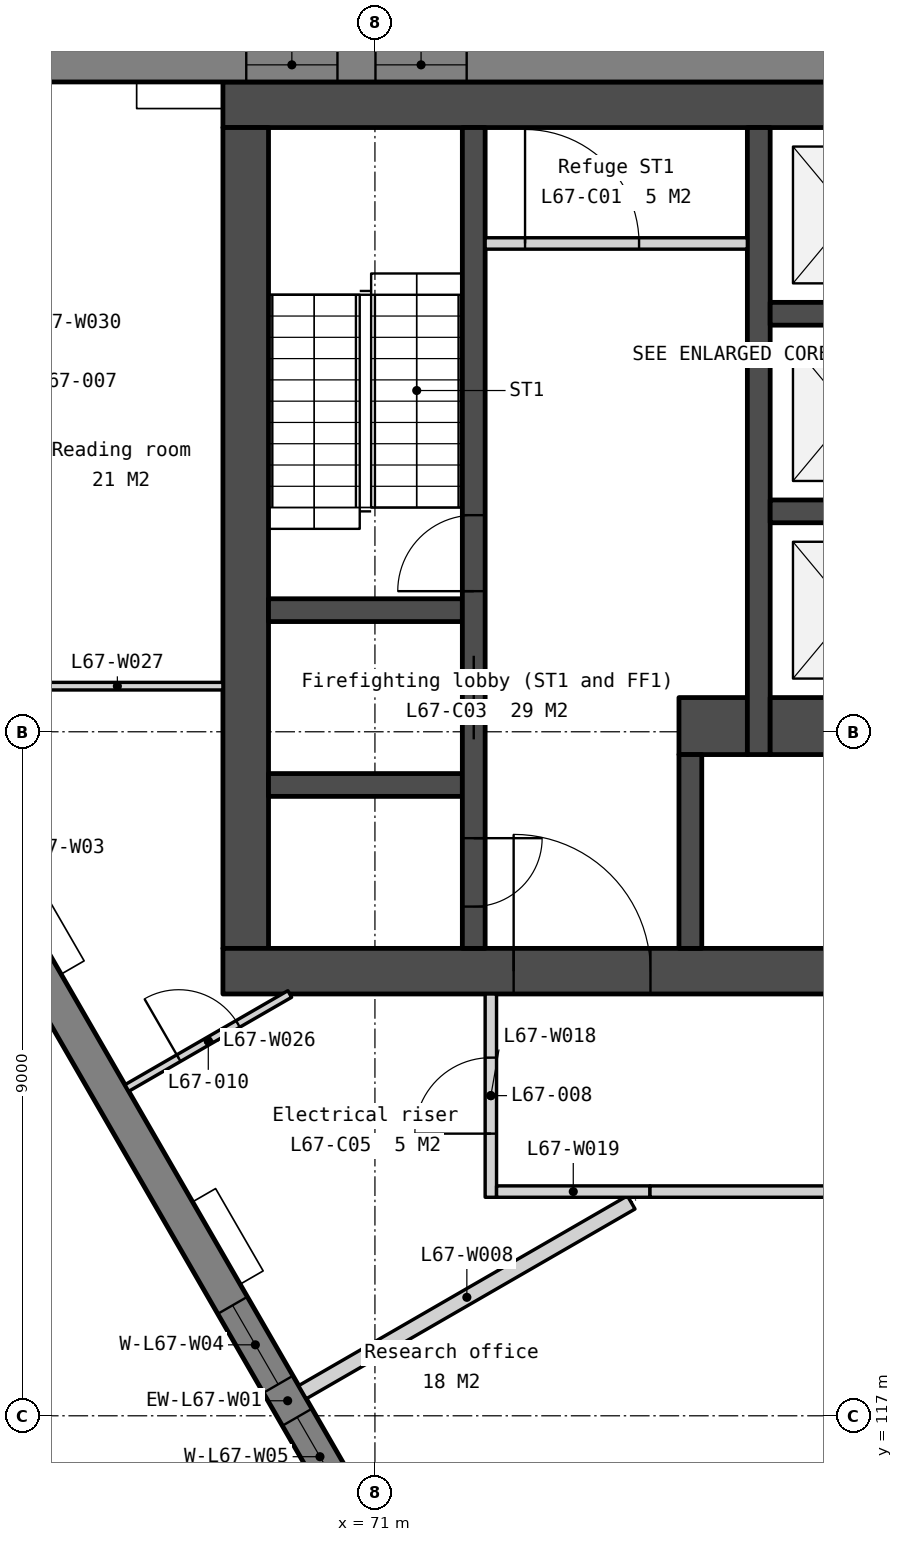
"""IFC4 building model, lengths in metres.
Left out: names, types, materials, properties, quantities, classifications, styles, units other than length and angle.
Written with IfcOpenShell. Run it as: python <this file> out.ifc"""

import sys

from ifc_helpers import new_model, si_unit, direction, frame, frame_2d, origin, place, context, subcontext, project, spatial, polyline, rectangle, outline, extrude, element, fill, save


model = new_model("IFC4")
c1 = context("Model", 3, precision=1e-05, world=origin(), true_north=direction((0.0, 1.0)))
c2 = subcontext(c1, "Body", "Model", "MODEL_VIEW")
j1 = project(units=[si_unit("LENGTHUNIT", "METRE"), si_unit("PLANEANGLEUNIT", "RADIAN")], contexts=[c1])
p1 = place(None, origin())
s1 = spatial("IfcSite", under=j1, at=p1, CompositionType="ELEMENT")
p2 = place(p1, origin())
s2 = spatial("IfcBuilding", under=s1, at=p2, CompositionType="ELEMENT")
p3 = place(p2, frame((0.0, 0.0, 273.8)))
s3 = spatial("IfcBuildingStorey", under=s2, at=p3, CompositionType="ELEMENT", Elevation=273.8)
p4 = place(p3, frame((69.0, 134.25, 0.0), z_axis=(0.0, 0.0, 1.0), x_axis=(1.0, 0.0, 0.0)))
e1 = element("IfcWall", 1, at=p4, inside=s3, PredefinedType="SOLIDWALL", context=c2, shape_type="SweptSolid", body=[
    extrude(rectangle(XDim=22.0, YDim=0.6, at=frame_2d((11.0, 0.0))), origin(), (0.0, 0.0, 1.0), 3.75),
])
p5 = place(p3, frame((69.3, 133.95, 0.0), z_axis=(0.0, 0.0, 1.0), x_axis=(0.0, -1.0, 0.0)))
e2 = element("IfcWall", 2, at=p5, inside=s3, PredefinedType="SOLIDWALL", context=c2, shape_type="SweptSolid", body=[
    extrude(rectangle(XDim=10.8, YDim=0.6, at=frame_2d((5.4, 0.0))), origin(), (0.0, 0.0, 1.0), 3.75),
])
p6 = place(p3, frame((69.0, 122.85, 0.0), z_axis=(0.0, 0.0, 1.0), x_axis=(1.0, 0.0, 0.0)))
e3 = element("IfcWall", 3, at=p6, inside=s3, PredefinedType="SOLIDWALL", context=c2, shape_type="SweptSolid", body=[
    extrude(rectangle(XDim=22.0, YDim=0.6, at=frame_2d((11.0, 0.0))), origin(), (0.0, 0.0, 1.0), 3.75),
])
p7 = place(p6, frame((16.375, 0.0, 0.0)))
e4 = element("IfcOpeningElement", 4, at=p7, cuts=e3, PredefinedType="OPENING", context=c2, shape_type="SweptSolid", body=[
    extrude(rectangle(XDim=1.8, YDim=2.1, at=frame_2d((0.9, 1.05))), frame((0.0, 0.31, 0.0), z_axis=(0.0, -1.0, 0.0), x_axis=(1.0, 0.0, 0.0)), (0.0, 0.0, 1.0), 0.62),
])
p8 = place(p6, frame((3.825, 0.0, 0.0)))
e5 = element("IfcOpeningElement", 5, at=p8, cuts=e3, PredefinedType="OPENING", context=c2, shape_type="SweptSolid", body=[
    extrude(rectangle(XDim=1.8, YDim=2.1, at=frame_2d((0.9, 1.05))), frame((0.0, 0.31, 0.0), z_axis=(0.0, -1.0, 0.0), x_axis=(1.0, 0.0, 0.0)), (0.0, 0.0, 1.0), 0.62),
])
p9 = place(p6, frame((12.85, 0.0, 0.0)))
e6 = element("IfcOpeningElement", 6, at=p9, cuts=e3, PredefinedType="OPENING", context=c2, shape_type="SweptSolid", body=[
    extrude(rectangle(XDim=1.5, YDim=2.1, at=frame_2d((0.75, 1.05))), frame((0.0, 0.31, 0.0), z_axis=(0.0, -1.0, 0.0), x_axis=(1.0, 0.0, 0.0)), (0.0, 0.0, 1.0), 0.62),
])
for number, where, z_axis, x_axis in (
    (7, (69.6, 127.6, 0.0), (0.0, 0.0, 1.0), (1.0, 0.0, 0.0)),
    (8, (69.6, 125.3, 0.0), (0.0, 0.0, 1.0), (1.0, 0.0, 0.0)),
):
    element("IfcWall", number, at=place(p3, frame(where, z_axis=z_axis, x_axis=x_axis)), inside=s3, PredefinedType="SOLIDWALL", context=c2, shape_type="SweptSolid", body=[
        extrude(rectangle(XDim=2.55, YDim=0.3, at=frame_2d((1.275, 0.0))), origin(), (0.0, 0.0, 1.0), 3.75),
    ])
p10 = place(p3, frame((72.3, 133.95, 0.0), z_axis=(0.0, 0.0, 1.0), x_axis=(0.0, -1.0, 0.0)))
e9 = element("IfcWall", 9, at=p10, inside=s3, PredefinedType="SOLIDWALL", context=c2, shape_type="SweptSolid", body=[
    extrude(rectangle(XDim=10.8, YDim=0.3, at=frame_2d((5.4, 0.0))), origin(), (0.0, 0.0, 1.0), 3.75),
])
p11 = place(p10, frame((6.95, 0.0, 0.0)))
e10 = element("IfcOpeningElement", 10, at=p11, cuts=e9, PredefinedType="OPENING", context=c2, shape_type="SweptSolid", body=[
    extrude(rectangle(XDim=1.1, YDim=2.1, at=frame_2d((0.55, 1.05))), frame((0.0, 0.16, 0.0), z_axis=(0.0, -1.0, 0.0), x_axis=(1.0, 0.0, 0.0)), (0.0, 0.0, 1.0), 0.32),
])
p12 = place(p10, frame((9.35, 0.0, 0.0)))
e11 = element("IfcOpeningElement", 11, at=p12, cuts=e9, PredefinedType="OPENING", context=c2, shape_type="SweptSolid", body=[
    extrude(rectangle(XDim=0.9, YDim=2.1, at=frame_2d((0.45, 1.05))), frame((0.0, 0.16, 0.0), z_axis=(0.0, -1.0, 0.0), x_axis=(1.0, 0.0, 0.0)), (0.0, 0.0, 1.0), 0.32),
])
p13 = place(p10, frame((5.1, 0.0, 0.0)))
e12 = element("IfcOpeningElement", 12, at=p13, cuts=e9, PredefinedType="OPENING", context=c2, shape_type="SweptSolid", body=[
    extrude(rectangle(XDim=1.0, YDim=2.1, at=frame_2d((0.5, 1.05))), frame((0.0, 0.16, 0.0), z_axis=(0.0, -1.0, 0.0), x_axis=(1.0, 0.0, 0.0)), (0.0, 0.0, 1.0), 0.32),
])
p14 = place(p3, frame((72.45, 132.425, 0.0), z_axis=(0.0, 0.0, 1.0), x_axis=(1.0, 0.0, 0.0)))
e13 = element("IfcWall", 13, at=p14, inside=s3, PredefinedType="PARTITIONING", context=c2, shape_type="SweptSolid", body=[
    extrude(rectangle(XDim=3.45, YDim=0.15, at=frame_2d((1.725, 0.0))), origin(), (0.0, 0.0, 1.0), 3.75),
])
p15 = place(p14, frame((0.525, 0.0, 0.0)))
e14 = element("IfcOpeningElement", 14, at=p15, cuts=e13, PredefinedType="OPENING", context=c2, shape_type="SweptSolid", body=[
    extrude(rectangle(XDim=1.5, YDim=2.1, at=frame_2d((0.75, 1.05))), frame((0.0, 0.085, 0.0), z_axis=(0.0, -1.0, 0.0), x_axis=(1.0, 0.0, 0.0)), (0.0, 0.0, 1.0), 0.17),
])
p16 = place(p3, frame((75.0, 126.075, 0.0), z_axis=(0.0, 0.0, 1.0), x_axis=(1.0, 0.0, 0.0)))
e15 = element("IfcWall", 15, at=p16, inside=s3, PredefinedType="SOLIDWALL", context=c2, shape_type="SweptSolid", body=[
    extrude(rectangle(XDim=0.9, YDim=0.75, at=frame_2d((0.45, 0.0))), origin(), (0.0, 0.0, 1.0), 3.75),
])
p17 = place(p3, frame((75.15, 125.7, 0.0), z_axis=(0.0, 0.0, 1.0), x_axis=(0.0, -1.0, 0.0)))
e16 = element("IfcWall", 16, at=p17, inside=s3, PredefinedType="SOLIDWALL", context=c2, shape_type="SweptSolid", body=[
    extrude(rectangle(XDim=2.55, YDim=0.3, at=frame_2d((1.275, 0.0))), origin(), (0.0, 0.0, 1.0), 3.75),
])
p18 = place(p3, frame((76.05, 133.95, 0.0), z_axis=(0.0, 0.0, 1.0), x_axis=(0.0, -1.0, 0.0)))
e17 = element("IfcWall", 17, at=p18, inside=s3, PredefinedType="SOLIDWALL", context=c2, shape_type="SweptSolid", body=[
    extrude(rectangle(XDim=8.25, YDim=0.3, at=frame_2d((4.125, 0.0))), origin(), (0.0, 0.0, 1.0), 3.75),
])
for number, where, z_axis, x_axis in (
    (18, (76.2, 131.5, 0.0), (0.0, 0.0, 1.0), (1.0, 0.0, 0.0)),
    (19, (76.2, 128.9, 0.0), (0.0, 0.0, 1.0), (1.0, 0.0, 0.0)),
):
    element("IfcWall", number, at=place(p3, frame(where, z_axis=z_axis, x_axis=x_axis)), inside=s3, PredefinedType="SOLIDWALL", context=c2, shape_type="SweptSolid", body=[
        extrude(rectangle(XDim=2.1, YDim=0.3, at=frame_2d((1.05, 0.0))), origin(), (0.0, 0.0, 1.0), 3.75),
    ])
p19 = place(p3, frame((76.2, 126.075, 0.0), z_axis=(0.0, 0.0, 1.0), x_axis=(1.0, 0.0, 0.0)))
e20 = element("IfcWall", 20, at=p19, inside=s3, PredefinedType="SOLIDWALL", context=c2, shape_type="SweptSolid", body=[
    extrude(rectangle(XDim=2.1, YDim=0.75, at=frame_2d((1.05, 0.0))), origin(), (0.0, 0.0, 1.0), 3.75),
])
p20 = place(p3, frame((98.486, 134.775, -0.15), z_axis=(0.0, 0.0, 1.0), x_axis=(-1.0, 0.0, 0.0)))
e21 = element("IfcWall", 21, at=p20, inside=s3, PredefinedType="SOLIDWALL", context=c2, shape_type="SweptSolid", body=[
    extrude(outline(polyline([(36.972, 0.0), (36.972, 3.9), (0.0, 3.9), (0.0, 0.0), (36.972, 0.0)])), frame((0.0, 0.225, 0.0), z_axis=(0.0, -1.0, 0.0), x_axis=(1.0, 0.0, 0.0)), (0.0, 0.0, 1.0), 0.45),
])
p21 = place(p20, frame((0.715, 0.0, 0.95)))
e22 = element("IfcOpeningElement", 22, at=p21, cuts=e21, PredefinedType="OPENING", context=c2, shape_type="SweptSolid", body=[
    extrude(rectangle(XDim=1.2, YDim=2.2, at=frame_2d((0.6, 1.1))), frame((0.0, 0.235, 0.0), z_axis=(0.0, -1.0, 0.0), x_axis=(1.0, 0.0, 0.0)), (0.0, 0.0, 1.0), 0.47),
])
p22 = place(p20, frame((7.793, 0.0, 0.95)))
e23 = element("IfcOpeningElement", 23, at=p22, cuts=e21, PredefinedType="OPENING", context=c2, shape_type="SweptSolid", body=[
    extrude(rectangle(XDim=1.2, YDim=2.2, at=frame_2d((0.6, 1.1))), frame((0.0, 0.235, 0.0), z_axis=(0.0, -1.0, 0.0), x_axis=(1.0, 0.0, 0.0)), (0.0, 0.0, 1.0), 0.47),
])
p23 = place(p20, frame((9.493, 0.0, 0.95)))
e24 = element("IfcOpeningElement", 24, at=p23, cuts=e21, PredefinedType="OPENING", context=c2, shape_type="SweptSolid", body=[
    extrude(rectangle(XDim=1.2, YDim=2.2, at=frame_2d((0.6, 1.1))), frame((0.0, 0.235, 0.0), z_axis=(0.0, -1.0, 0.0), x_axis=(1.0, 0.0, 0.0)), (0.0, 0.0, 1.0), 0.47),
])
p24 = place(p20, frame((17.036, 0.0, 0.95)))
e25 = element("IfcOpeningElement", 25, at=p24, cuts=e21, PredefinedType="OPENING", context=c2, shape_type="SweptSolid", body=[
    extrude(rectangle(XDim=1.2, YDim=2.2, at=frame_2d((0.6, 1.1))), frame((0.0, 0.235, 0.0), z_axis=(0.0, -1.0, 0.0), x_axis=(1.0, 0.0, 0.0)), (0.0, 0.0, 1.0), 0.47),
])
p25 = place(p20, frame((18.736, 0.0, 0.95)))
e26 = element("IfcOpeningElement", 26, at=p25, cuts=e21, PredefinedType="OPENING", context=c2, shape_type="SweptSolid", body=[
    extrude(rectangle(XDim=1.2, YDim=2.2, at=frame_2d((0.6, 1.1))), frame((0.0, 0.235, 0.0), z_axis=(0.0, -1.0, 0.0), x_axis=(1.0, 0.0, 0.0)), (0.0, 0.0, 1.0), 0.47),
])
p26 = place(p20, frame((26.279, 0.0, 0.95)))
e27 = element("IfcOpeningElement", 27, at=p26, cuts=e21, PredefinedType="OPENING", context=c2, shape_type="SweptSolid", body=[
    extrude(rectangle(XDim=1.2, YDim=2.2, at=frame_2d((0.6, 1.1))), frame((0.0, 0.235, 0.0), z_axis=(0.0, -1.0, 0.0), x_axis=(1.0, 0.0, 0.0)), (0.0, 0.0, 1.0), 0.47),
])
p27 = place(p20, frame((27.979, 0.0, 0.95)))
e28 = element("IfcOpeningElement", 28, at=p27, cuts=e21, PredefinedType="OPENING", context=c2, shape_type="SweptSolid", body=[
    extrude(rectangle(XDim=1.2, YDim=2.2, at=frame_2d((0.6, 1.1))), frame((0.0, 0.235, 0.0), z_axis=(0.0, -1.0, 0.0), x_axis=(1.0, 0.0, 0.0)), (0.0, 0.0, 1.0), 0.47),
])
p28 = place(p20, frame((35.058, 0.0, 0.95)))
e29 = element("IfcOpeningElement", 29, at=p28, cuts=e21, PredefinedType="OPENING", context=c2, shape_type="SweptSolid", body=[
    extrude(rectangle(XDim=1.2, YDim=2.2, at=frame_2d((0.6, 1.1))), frame((0.0, 0.235, 0.0), z_axis=(0.0, -1.0, 0.0), x_axis=(1.0, 0.0, 0.0)), (0.0, 0.0, 1.0), 0.47),
])
p29 = place(p3, frame((60.609, 133.207, -0.15), z_axis=(0.0, 0.0, 1.0), x_axis=(0.500002536638, -0.866023939251, 0.0)))
e30 = element("IfcWall", 30, at=p29, inside=s3, PredefinedType="SOLIDWALL", context=c2, shape_type="SweptSolid", body=[
    extrude(outline(polyline([(36.972, 0.0), (36.972, 3.9), (0.0, 3.9), (0.0, 0.0), (36.972, 0.0)])), frame((0.0, 0.225, 0.0), z_axis=(0.0, -1.0, 0.0), x_axis=(1.0, 0.0, 0.0)), (0.0, 0.0, 1.0), 0.45),
])
p30 = place(p29, frame((0.715, 0.0, 0.95)))
e31 = element("IfcOpeningElement", 31, at=p30, cuts=e30, PredefinedType="OPENING", context=c2, shape_type="SweptSolid", body=[
    extrude(rectangle(XDim=1.2, YDim=2.2, at=frame_2d((0.6, 1.1))), frame((0.0, 0.235, 0.0), z_axis=(0.0, -1.0, 0.0), x_axis=(1.0, 0.0, 0.0)), (0.0, 0.0, 1.0), 0.47),
])
p31 = place(p29, frame((7.793, 0.0, 0.95)))
e32 = element("IfcOpeningElement", 32, at=p31, cuts=e30, PredefinedType="OPENING", context=c2, shape_type="SweptSolid", body=[
    extrude(rectangle(XDim=1.2, YDim=2.2, at=frame_2d((0.6, 1.1))), frame((0.0, 0.235, 0.0), z_axis=(0.0, -1.0, 0.0), x_axis=(1.0, 0.0, 0.0)), (0.0, 0.0, 1.0), 0.47),
])
p32 = place(p29, frame((9.493, 0.0, 0.95)))
e33 = element("IfcOpeningElement", 33, at=p32, cuts=e30, PredefinedType="OPENING", context=c2, shape_type="SweptSolid", body=[
    extrude(rectangle(XDim=1.2, YDim=2.2, at=frame_2d((0.6, 1.1))), frame((0.0, 0.235, 0.0), z_axis=(0.0, -1.0, 0.0), x_axis=(1.0, 0.0, 0.0)), (0.0, 0.0, 1.0), 0.47),
])
p33 = place(p29, frame((17.036, 0.0, 0.95)))
e34 = element("IfcOpeningElement", 34, at=p33, cuts=e30, PredefinedType="OPENING", context=c2, shape_type="SweptSolid", body=[
    extrude(rectangle(XDim=1.2, YDim=2.2, at=frame_2d((0.6, 1.1))), frame((0.0, 0.235, 0.0), z_axis=(0.0, -1.0, 0.0), x_axis=(1.0, 0.0, 0.0)), (0.0, 0.0, 1.0), 0.47),
])
p34 = place(p29, frame((18.736, 0.0, 0.95)))
e35 = element("IfcOpeningElement", 35, at=p34, cuts=e30, PredefinedType="OPENING", context=c2, shape_type="SweptSolid", body=[
    extrude(rectangle(XDim=1.2, YDim=2.2, at=frame_2d((0.6, 1.1))), frame((0.0, 0.235, 0.0), z_axis=(0.0, -1.0, 0.0), x_axis=(1.0, 0.0, 0.0)), (0.0, 0.0, 1.0), 0.47),
])
p35 = place(p29, frame((26.279, 0.0, 0.95)))
e36 = element("IfcOpeningElement", 36, at=p35, cuts=e30, PredefinedType="OPENING", context=c2, shape_type="SweptSolid", body=[
    extrude(rectangle(XDim=1.2, YDim=2.2, at=frame_2d((0.6, 1.1))), frame((0.0, 0.235, 0.0), z_axis=(0.0, -1.0, 0.0), x_axis=(1.0, 0.0, 0.0)), (0.0, 0.0, 1.0), 0.47),
])
p36 = place(p29, frame((27.979, 0.0, 0.95)))
e37 = element("IfcOpeningElement", 37, at=p36, cuts=e30, PredefinedType="OPENING", context=c2, shape_type="SweptSolid", body=[
    extrude(rectangle(XDim=1.2, YDim=2.2, at=frame_2d((0.6, 1.1))), frame((0.0, 0.235, 0.0), z_axis=(0.0, -1.0, 0.0), x_axis=(1.0, 0.0, 0.0)), (0.0, 0.0, 1.0), 0.47),
])
p37 = place(p29, frame((35.058, 0.0, 0.95)))
e38 = element("IfcOpeningElement", 38, at=p37, cuts=e30, PredefinedType="OPENING", context=c2, shape_type="SweptSolid", body=[
    extrude(rectangle(XDim=1.2, YDim=2.2, at=frame_2d((0.6, 1.1))), frame((0.0, 0.235, 0.0), z_axis=(0.0, -1.0, 0.0), x_axis=(1.0, 0.0, 0.0)), (0.0, 0.0, 1.0), 0.47),
])
p38 = place(p3, frame((70.047, 117.31, 0.0), z_axis=(0.0, 0.0, 1.0), x_axis=(0.866032544947, 0.499987630939, 0.0)))
e39 = element("IfcWall", 39, at=p38, inside=s3, PredefinedType="PARTITIONING", context=c2, shape_type="SweptSolid", body=[
    extrude(rectangle(XDim=4.994, YDim=0.2, at=frame_2d((2.497, 0.0))), origin(), (0.0, 0.0, 1.0), 3.75),
])
p39 = place(p3, frame((72.525, 119.875, 0.0), z_axis=(0.0, 0.0, 1.0), x_axis=(0.0, 1.0, 0.0)))
e40 = element("IfcWall", 40, at=p39, inside=s3, PredefinedType="PARTITIONING", context=c2, shape_type="SweptSolid", body=[
    extrude(rectangle(XDim=2.675, YDim=0.15, at=frame_2d((1.337, 0.0))), origin(), (0.0, 0.0, 1.0), 3.75),
])
p40 = place(p39, frame((0.837, 0.0, 0.0)))
e41 = element("IfcOpeningElement", 41, at=p40, cuts=e40, PredefinedType="OPENING", context=c2, shape_type="SweptSolid", body=[
    extrude(rectangle(XDim=1.0, YDim=2.1, at=frame_2d((0.5, 1.05))), frame((0.0, 0.085, 0.0), z_axis=(0.0, -1.0, 0.0), x_axis=(1.0, 0.0, 0.0)), (0.0, 0.0, 1.0), 0.17),
])
p41 = place(p3, frame((72.6, 119.95, 0.0), z_axis=(0.0, 0.0, 1.0), x_axis=(1.0, 0.0, 0.0)))
e42 = element("IfcWall", 42, at=p41, inside=s3, PredefinedType="PARTITIONING", context=c2, shape_type="SweptSolid", body=[
    extrude(rectangle(XDim=2.019, YDim=0.15, at=frame_2d((1.009, 0.0))), origin(), (0.0, 0.0, 1.0), 3.75),
])
p42 = place(p3, frame((74.619, 119.95, 0.0), z_axis=(0.0, 0.0, 1.0), x_axis=(1.0, 0.0, 0.0)))
e43 = element("IfcWall", 43, at=p42, inside=s3, PredefinedType="PARTITIONING", context=c2, shape_type="SweptSolid", body=[
    extrude(rectangle(XDim=6.581, YDim=0.15, at=frame_2d((3.291, 0.0))), origin(), (0.0, 0.0, 1.0), 3.75),
])
p43 = place(p42, frame((2.791, 0.0, 0.0)))
e44 = element("IfcOpeningElement", 44, at=p43, cuts=e43, PredefinedType="OPENING", context=c2, shape_type="SweptSolid", body=[
    extrude(rectangle(XDim=1.0, YDim=2.1, at=frame_2d((0.5, 1.05))), frame((0.0, 0.085, 0.0), z_axis=(0.0, -1.0, 0.0), x_axis=(1.0, 0.0, 0.0)), (0.0, 0.0, 1.0), 0.17),
])
p44 = place(p3, frame((67.736, 121.313, 0.0), z_axis=(0.0, 0.0, 1.0), x_axis=(0.86604923931, 0.499958713387, 0.0)))
e45 = element("IfcWall", 45, at=p44, inside=s3, PredefinedType="PARTITIONING", context=c2, shape_type="SweptSolid", body=[
    extrude(rectangle(XDim=2.475, YDim=0.1, at=frame_2d((1.237, 0.0))), origin(), (0.0, 0.0, 1.0), 3.75),
])
p45 = place(p44, frame((0.787, 0.0, 0.0)))
e46 = element("IfcOpeningElement", 46, at=p45, cuts=e45, PredefinedType="OPENING", context=c2, shape_type="SweptSolid", body=[
    extrude(rectangle(XDim=0.9, YDim=2.1, at=frame_2d((0.45, 1.05))), frame((0.0, 0.06, 0.0), z_axis=(0.0, -1.0, 0.0), x_axis=(1.0, 0.0, 0.0)), (0.0, 0.0, 1.0), 0.12),
])
p46 = place(p3, frame((66.222, 126.6, 0.0), z_axis=(0.0, 0.0, 1.0), x_axis=(1.0, 0.0, 0.0)))
e47 = element("IfcWall", 47, at=p46, inside=s3, PredefinedType="PARTITIONING", context=c2, shape_type="SweptSolid", body=[
    extrude(rectangle(XDim=2.778, YDim=0.1, at=frame_2d((1.389, 0.0))), origin(), (0.0, 0.0, 1.0), 3.75),
])
p47 = place(p11, origin())
e48 = element("IfcDoor", 48, at=p47, inside=s3, OperationType="SLIDING_TO_LEFT", PredefinedType="DOOR", context=c2, shape_type="SweptSolid", body=[
    extrude(rectangle(XDim=1.1, YDim=2.1, at=frame_2d((0.55, 1.05))), frame((0.0, 0.025, 0.0), z_axis=(0.0, -1.0, 0.0), x_axis=(1.0, 0.0, 0.0)), (0.0, 0.0, 1.0), 0.05),
])
fill(e10, e48)
p48 = place(p8, origin())
e49 = element("IfcDoor", 49, at=p48, inside=s3, OperationType="DOUBLE_DOOR_DOUBLE_SWING", PredefinedType="DOOR", context=c2, shape_type="SweptSolid", body=[
    extrude(rectangle(XDim=1.8, YDim=2.1, at=frame_2d((0.9, 1.05))), frame((0.0, 0.025, 0.0), z_axis=(0.0, -1.0, 0.0), x_axis=(1.0, 0.0, 0.0)), (0.0, 0.0, 1.0), 0.05),
])
fill(e5, e49)
p49 = place(p15, origin())
e50 = element("IfcDoor", 50, at=p49, inside=s3, OperationType="DOUBLE_DOOR_DOUBLE_SWING", PredefinedType="DOOR", context=c2, shape_type="SweptSolid", body=[
    extrude(rectangle(XDim=1.5, YDim=2.1, at=frame_2d((0.75, 1.05))), frame((0.0, 0.025, 0.0), z_axis=(0.0, -1.0, 0.0), x_axis=(1.0, 0.0, 0.0)), (0.0, 0.0, 1.0), 0.05),
])
fill(e14, e50)
p50 = place(p12, origin())
e51 = element("IfcDoor", 51, at=p50, inside=s3, OperationType="SINGLE_SWING_LEFT", PredefinedType="DOOR", context=c2, shape_type="SweptSolid", body=[
    extrude(rectangle(XDim=0.9, YDim=2.1, at=frame_2d((0.45, 1.05))), frame((0.0, 0.025, 0.0), z_axis=(0.0, -1.0, 0.0), x_axis=(1.0, 0.0, 0.0)), (0.0, 0.0, 1.0), 0.05),
])
fill(e11, e51)
p51 = place(p13, origin())
e52 = element("IfcDoor", 52, at=p51, inside=s3, OperationType="SINGLE_SWING_RIGHT", PredefinedType="DOOR", context=c2, shape_type="SweptSolid", body=[
    extrude(rectangle(XDim=1.0, YDim=2.1, at=frame_2d((0.5, 1.05))), frame((0.0, 0.025, 0.0), z_axis=(0.0, -1.0, 0.0), x_axis=(1.0, 0.0, 0.0)), (0.0, 0.0, 1.0), 0.05),
])
fill(e12, e52)
p52 = place(p26, origin())
e53 = element("IfcWindow", 53, at=p52, inside=s3, PartitioningType="SINGLE_PANEL", PredefinedType="WINDOW", context=c2, shape_type="SweptSolid", body=[
    extrude(rectangle(XDim=1.2, YDim=2.2, at=frame_2d((0.6, 1.1))), frame((0.0, 0.03, 0.0), z_axis=(0.0, -1.0, 0.0), x_axis=(1.0, 0.0, 0.0)), (0.0, 0.0, 1.0), 0.06),
])
fill(e27, e53)
p53 = place(p27, origin())
e54 = element("IfcWindow", 54, at=p53, inside=s3, PartitioningType="SINGLE_PANEL", PredefinedType="WINDOW", context=c2, shape_type="SweptSolid", body=[
    extrude(rectangle(XDim=1.2, YDim=2.2, at=frame_2d((0.6, 1.1))), frame((0.0, 0.03, 0.0), z_axis=(0.0, -1.0, 0.0), x_axis=(1.0, 0.0, 0.0)), (0.0, 0.0, 1.0), 0.06),
])
fill(e28, e54)
p54 = place(p33, origin())
e55 = element("IfcWindow", 55, at=p54, inside=s3, PartitioningType="SINGLE_PANEL", PredefinedType="WINDOW", context=c2, shape_type="SweptSolid", body=[
    extrude(rectangle(XDim=1.2, YDim=2.2, at=frame_2d((0.6, 1.1))), frame((0.0, 0.03, 0.0), z_axis=(0.0, -1.0, 0.0), x_axis=(1.0, 0.0, 0.0)), (0.0, 0.0, 1.0), 0.06),
])
fill(e34, e55)
p55 = place(p34, origin())
e56 = element("IfcWindow", 56, at=p55, inside=s3, PartitioningType="SINGLE_PANEL", PredefinedType="WINDOW", context=c2, shape_type="SweptSolid", body=[
    extrude(rectangle(XDim=1.2, YDim=2.2, at=frame_2d((0.6, 1.1))), frame((0.0, 0.03, 0.0), z_axis=(0.0, -1.0, 0.0), x_axis=(1.0, 0.0, 0.0)), (0.0, 0.0, 1.0), 0.06),
])
fill(e35, e56)
p56 = place(p40, origin())
e57 = element("IfcDoor", 57, at=p56, inside=s3, OperationType="SINGLE_SWING_LEFT", PredefinedType="DOOR", context=c2, shape_type="SweptSolid", body=[
    extrude(rectangle(XDim=1.0, YDim=2.1, at=frame_2d((0.5, 1.05))), frame((0.0, 0.025, 0.0), z_axis=(0.0, -1.0, 0.0), x_axis=(1.0, 0.0, 0.0)), (0.0, 0.0, 1.0), 0.05),
])
fill(e41, e57)
p57 = place(p45, origin())
e58 = element("IfcDoor", 58, at=p57, inside=s3, OperationType="SINGLE_SWING_LEFT", PredefinedType="DOOR", context=c2, shape_type="SweptSolid", body=[
    extrude(rectangle(XDim=0.9, YDim=2.1, at=frame_2d((0.45, 1.05))), frame((0.0, 0.025, 0.0), z_axis=(0.0, -1.0, 0.0), x_axis=(1.0, 0.0, 0.0)), (0.0, 0.0, 1.0), 0.05),
])
fill(e46, e58)
save(model, sys.argv[1])
